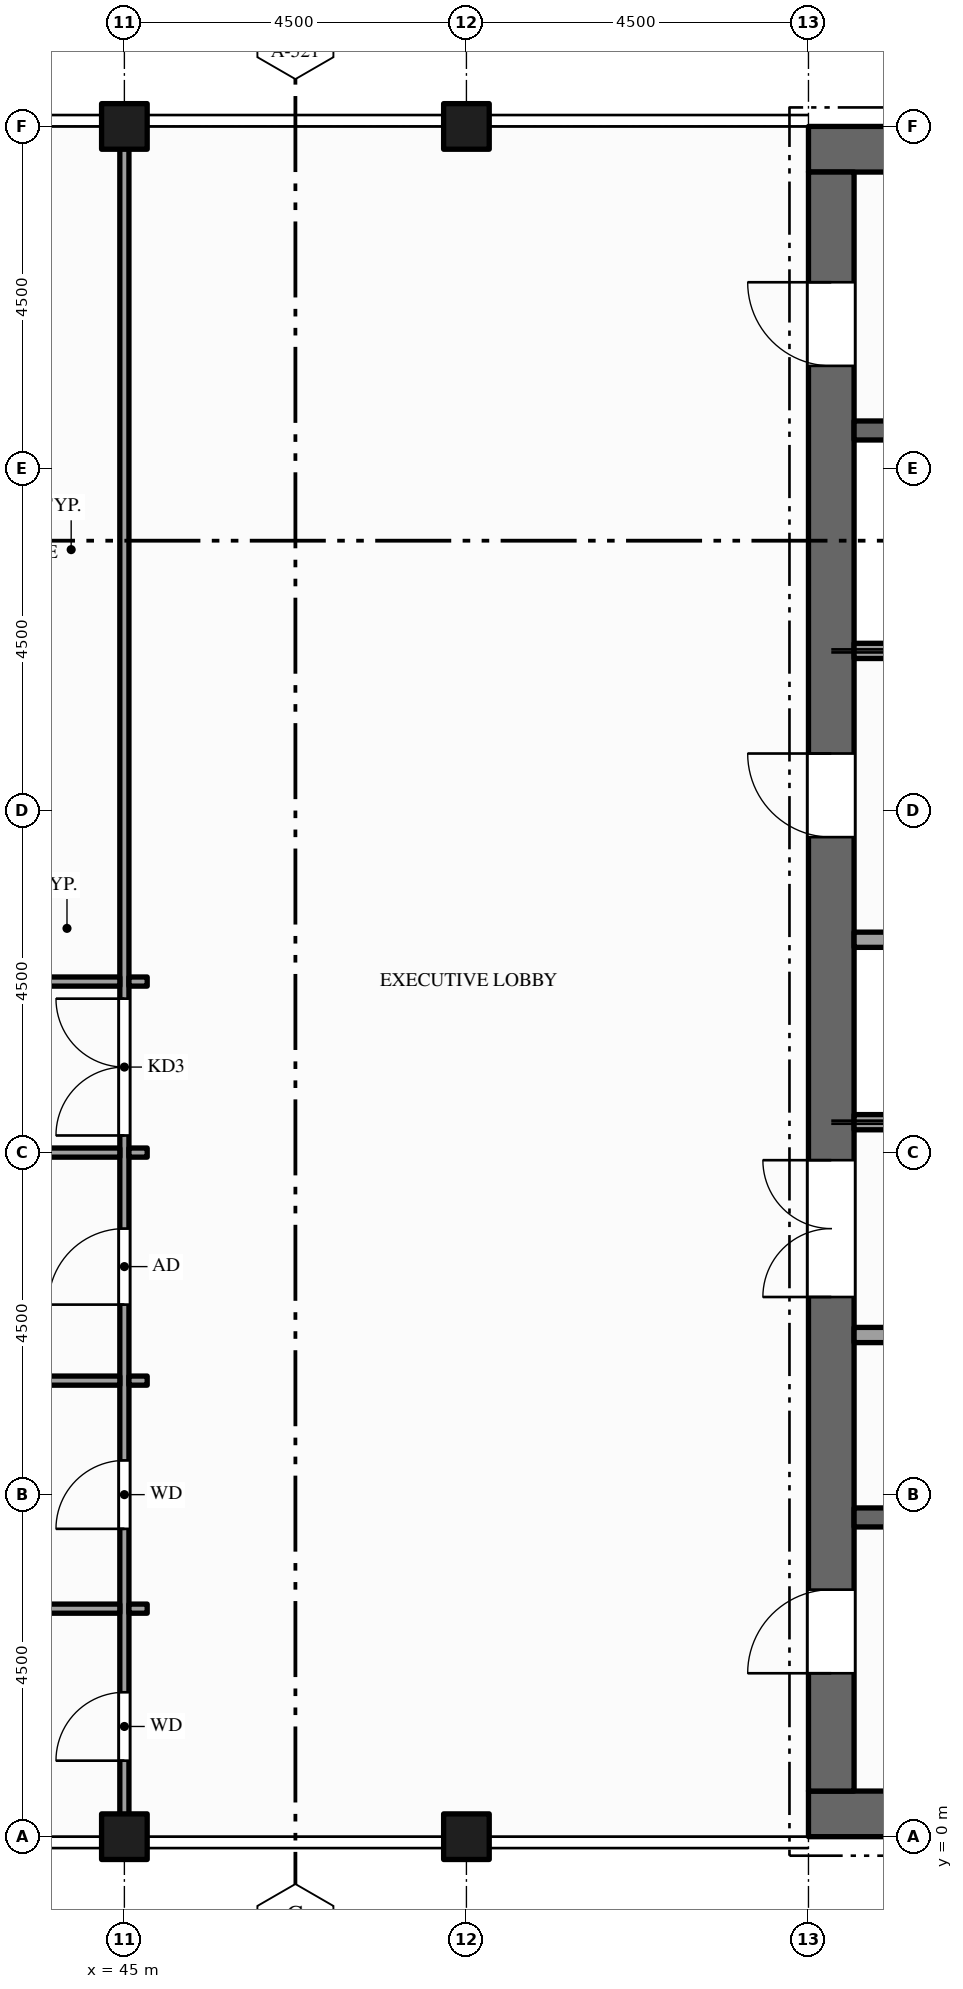
"""IFC4 building model, lengths in metres.
Left out: names, types, materials, properties, quantities, classifications, styles, units other than length and angle.
Written with IfcOpenShell. Run it as: python <this file> out.ifc"""

import sys

from ifc_helpers import new_model, si_unit, direction, frame, frame_2d, origin, origin_2d, place, context, subcontext, project, spatial, rectangle, hollow_rectangle, extrude, element, fill, save


model = new_model("IFC4")
c1 = context("Model", 3, precision=1e-05, world=origin(), true_north=direction((0.0, 1.0)))
c2 = subcontext(c1, "Body", "Model", "MODEL_VIEW")
j1 = project(units=[si_unit("LENGTHUNIT", "METRE"), si_unit("PLANEANGLEUNIT", "RADIAN")], contexts=[c1])
p1 = place(None, origin())
s1 = spatial("IfcSite", under=j1, at=p1, CompositionType="ELEMENT")
p2 = place(p1, origin())
s2 = spatial("IfcBuilding", under=s1, at=p2, CompositionType="ELEMENT")
p3 = place(p2, frame((0.0, 0.0, 309.5)))
s3 = spatial("IfcBuildingStorey", under=s2, at=p3, CompositionType="ELEMENT", Elevation=309.5)
for number, where, z_axis, x_axis in (
    (1, (67.5, 0.3, -0.15), (0.0, 0.0, 1.0), (-1.0, 0.0, 0.0)),
    (2, (54.0, 22.2, -0.15), (0.0, 0.0, 1.0), (1.0, 0.0, 0.0)),
):
    element("IfcWall", number, at=place(p3, frame(where, z_axis=z_axis, x_axis=x_axis)), inside=s3, PredefinedType="SHEAR", context=c2, shape_type="SweptSolid", body=[
        extrude(rectangle(XDim=13.5, YDim=0.6, at=frame_2d((6.75, 0.0))), origin(), (0.0, 0.0, 1.0), 4.5),
    ])
p4 = place(p3, frame((54.3, 0.6, -0.15), z_axis=(0.0, 0.0, 1.0), x_axis=(0.0, 1.0, 0.0)))
e3 = element("IfcWall", 3, at=p4, inside=s3, PredefinedType="SHEAR", context=c2, shape_type="SweptSolid", body=[
    extrude(rectangle(XDim=21.3, YDim=0.6, at=frame_2d((10.65, 0.0))), origin(), (0.0, 0.0, 1.0), 4.5),
])
p5 = place(p4, frame((6.5, 0.0, 0.15)))
e4 = element("IfcOpeningElement", 4, at=p5, cuts=e3, PredefinedType="OPENING", context=c2, shape_type="SweptSolid", body=[
    extrude(rectangle(XDim=1.8, YDim=2.1, at=frame_2d((0.9, 1.05))), frame((0.0, 0.31, 0.0), z_axis=(0.0, -1.0, 0.0), x_axis=(1.0, 0.0, 0.0)), (0.0, 0.0, 1.0), 0.62),
])
p6 = place(p4, frame((12.55, 0.0, 0.15)))
e5 = element("IfcOpeningElement", 5, at=p6, cuts=e3, PredefinedType="OPENING", context=c2, shape_type="SweptSolid", body=[
    extrude(rectangle(XDim=1.1, YDim=2.1, at=frame_2d((0.55, 1.05))), frame((0.0, 0.31, 0.0), z_axis=(0.0, -1.0, 0.0), x_axis=(1.0, 0.0, 0.0)), (0.0, 0.0, 1.0), 0.62),
])
p7 = place(p4, frame((1.55, 0.0, 0.15)))
e6 = element("IfcOpeningElement", 6, at=p7, cuts=e3, PredefinedType="OPENING", context=c2, shape_type="SweptSolid", body=[
    extrude(rectangle(XDim=1.1, YDim=2.1, at=frame_2d((0.55, 1.05))), frame((0.0, 0.31, 0.0), z_axis=(0.0, -1.0, 0.0), x_axis=(1.0, 0.0, 0.0)), (0.0, 0.0, 1.0), 0.62),
])
p8 = place(p4, frame((18.75, 0.0, 0.15)))
e7 = element("IfcOpeningElement", 7, at=p8, cuts=e3, PredefinedType="OPENING", context=c2, shape_type="SweptSolid", body=[
    extrude(rectangle(XDim=1.1, YDim=2.1, at=frame_2d((0.55, 1.05))), frame((0.0, 0.31, 0.0), z_axis=(0.0, -1.0, 0.0), x_axis=(1.0, 0.0, 0.0)), (0.0, 0.0, 1.0), 0.62),
])
for number, where, z_axis, x_axis in (
    (8, (45.0, 0.0, -0.15), (0.0, 0.0, 1.0), (1.0, 0.0, 0.0)),
    (9, (45.0, 22.5, -0.15), (0.0, 0.0, 1.0), (1.0, 0.0, 0.0)),
    (10, (49.5, 0.0, -0.15), (0.0, 0.0, 1.0), (1.0, 0.0, 0.0)),
    (11, (49.5, 22.5, -0.15), (0.0, 0.0, 1.0), (1.0, 0.0, 0.0)),
):
    element("IfcColumn", number, at=place(p3, frame(where, z_axis=z_axis, x_axis=x_axis)), inside=s3, PredefinedType="COLUMN", context=c2, shape_type="SweptSolid", body=[
        extrude(hollow_rectangle(XDim=0.6, YDim=0.6, WallThickness=0.03, at=origin_2d()), origin(), (0.0, 0.0, 1.0), 4.5),
    ])
p9 = place(p3, frame((45.0, 0.01, 0.0), z_axis=(0.0, 0.0, 1.0), x_axis=(0.0, 1.0, 0.0)))
e12 = element("IfcWall", 12, at=p9, inside=s3, PredefinedType="PARTITIONING", context=c2, shape_type="SweptSolid", body=[
    extrude(rectangle(XDim=22.48, YDim=0.12, at=frame_2d((11.24, 0.0))), origin(), (0.0, 0.0, 1.0), 3.359),
])
p10 = place(p9, frame((9.215, 0.0, 0.0)))
e13 = element("IfcOpeningElement", 13, at=p10, cuts=e12, PredefinedType="OPENING", context=c2, shape_type="SweptSolid", body=[
    extrude(rectangle(XDim=1.8, YDim=2.1, at=frame_2d((0.9, 1.05))), frame((0.0, 0.07, 0.0), z_axis=(0.0, -1.0, 0.0), x_axis=(1.0, 0.0, 0.0)), (0.0, 0.0, 1.0), 0.14),
])
p11 = place(p9, frame((0.99, 0.0, 0.0)))
e14 = element("IfcOpeningElement", 14, at=p11, cuts=e12, PredefinedType="OPENING", context=c2, shape_type="SweptSolid", body=[
    extrude(rectangle(XDim=0.9, YDim=2.1, at=frame_2d((0.45, 1.05))), frame((0.0, 0.07, 0.0), z_axis=(0.0, -1.0, 0.0), x_axis=(1.0, 0.0, 0.0)), (0.0, 0.0, 1.0), 0.14),
])
p12 = place(p9, frame((4.04, 0.0, 0.0)))
e15 = element("IfcOpeningElement", 15, at=p12, cuts=e12, PredefinedType="OPENING", context=c2, shape_type="SweptSolid", body=[
    extrude(rectangle(XDim=0.9, YDim=2.1, at=frame_2d((0.45, 1.05))), frame((0.0, 0.07, 0.0), z_axis=(0.0, -1.0, 0.0), x_axis=(1.0, 0.0, 0.0)), (0.0, 0.0, 1.0), 0.14),
])
p13 = place(p9, frame((6.99, 0.0, 0.0)))
e16 = element("IfcOpeningElement", 16, at=p13, cuts=e12, PredefinedType="OPENING", context=c2, shape_type="SweptSolid", body=[
    extrude(rectangle(XDim=1.0, YDim=2.1, at=frame_2d((0.5, 1.05))), frame((0.0, 0.07, 0.0), z_axis=(0.0, -1.0, 0.0), x_axis=(1.0, 0.0, 0.0)), (0.0, 0.0, 1.0), 0.14),
])
p14 = place(p3, frame((40.56, 3.0, 0.0), z_axis=(0.0, 0.0, 1.0), x_axis=(1.0, 0.0, 0.0)))
e17 = element("IfcWall", 17, at=p14, inside=s3, PredefinedType="PARTITIONING", context=c2, shape_type="SweptSolid", body=[
    extrude(rectangle(XDim=4.38, YDim=0.12, at=frame_2d((2.19, 0.0))), origin(), (0.0, 0.0, 1.0), 3.359),
])
p15 = place(p3, frame((45.06, 3.0, 0.0), z_axis=(0.0, 0.0, 1.0), x_axis=(1.0, 0.0, 0.0)))
e18 = element("IfcWall", 18, at=p15, inside=s3, PredefinedType="PARTITIONING", context=c2, shape_type="SweptSolid", body=[
    extrude(rectangle(XDim=0.24, YDim=0.12, at=frame_2d((0.12, 0.0))), origin(), (0.0, 0.0, 1.0), 3.359),
])
p16 = place(p3, frame((54.6, 4.2, 0.0), z_axis=(0.0, 0.0, 1.0), x_axis=(1.0, 0.0, 0.0)))
e19 = element("IfcWall", 19, at=p16, inside=s3, PredefinedType="SHEAR", context=c2, shape_type="SweptSolid", body=[
    extrude(rectangle(XDim=6.675, YDim=0.25, at=frame_2d((3.337, 0.0))), origin(), (0.0, 0.0, 1.0), 4.35),
])
p17 = place(p3, frame((40.56, 6.0, 0.0), z_axis=(0.0, 0.0, 1.0), x_axis=(1.0, 0.0, 0.0)))
e20 = element("IfcWall", 20, at=p17, inside=s3, PredefinedType="PARTITIONING", context=c2, shape_type="SweptSolid", body=[
    extrude(rectangle(XDim=4.38, YDim=0.12, at=frame_2d((2.19, 0.0))), origin(), (0.0, 0.0, 1.0), 3.359),
])
p18 = place(p3, frame((45.06, 6.0, 0.0), z_axis=(0.0, 0.0, 1.0), x_axis=(1.0, 0.0, 0.0)))
e21 = element("IfcWall", 21, at=p18, inside=s3, PredefinedType="PARTITIONING", context=c2, shape_type="SweptSolid", body=[
    extrude(rectangle(XDim=0.24, YDim=0.12, at=frame_2d((0.12, 0.0))), origin(), (0.0, 0.0, 1.0), 3.359),
])
p19 = place(p3, frame((54.6, 6.6, 0.0), z_axis=(0.0, 0.0, 1.0), x_axis=(1.0, 0.0, 0.0)))
e22 = element("IfcWall", 22, at=p19, inside=s3, PredefinedType="PARTITIONING", context=c2, shape_type="SweptSolid", body=[
    extrude(rectangle(XDim=4.9, YDim=0.2, at=frame_2d((2.45, 0.0))), origin(), (0.0, 0.0, 1.0), 4.35),
])
p20 = place(p19, frame((2.0, 0.0, 0.0)))
e23 = element("IfcOpeningElement", 23, at=p20, cuts=e22, PredefinedType="OPENING", context=c2, shape_type="SweptSolid", body=[
    extrude(rectangle(XDim=0.9, YDim=2.1, at=frame_2d((0.45, 1.05))), frame((0.0, 0.11, 0.0), z_axis=(0.0, -1.0, 0.0), x_axis=(1.0, 0.0, 0.0)), (0.0, 0.0, 1.0), 0.22),
])
p21 = place(p3, frame((40.56, 9.0, 0.0), z_axis=(0.0, 0.0, 1.0), x_axis=(1.0, 0.0, 0.0)))
e24 = element("IfcWall", 24, at=p21, inside=s3, PredefinedType="PARTITIONING", context=c2, shape_type="SweptSolid", body=[
    extrude(rectangle(XDim=4.38, YDim=0.12, at=frame_2d((2.19, 0.0))), origin(), (0.0, 0.0, 1.0), 3.359),
])
p22 = place(p3, frame((45.06, 9.0, 0.0), z_axis=(0.0, 0.0, 1.0), x_axis=(1.0, 0.0, 0.0)))
e25 = element("IfcWall", 25, at=p22, inside=s3, PredefinedType="PARTITIONING", context=c2, shape_type="SweptSolid", body=[
    extrude(rectangle(XDim=0.24, YDim=0.12, at=frame_2d((0.12, 0.0))), origin(), (0.0, 0.0, 1.0), 3.359),
])
p23 = place(p3, frame((54.6, 9.4, 0.0), z_axis=(0.0, 0.0, 1.0), x_axis=(1.0, 0.0, 0.0)))
e26 = element("IfcWall", 26, at=p23, inside=s3, PredefinedType="SOLIDWALL", context=c2, shape_type="SweptSolid", body=[
    extrude(rectangle(XDim=2.7, YDim=0.2, at=frame_2d((1.35, 0.0))), origin(), (0.0, 0.0, 1.0), 4.35),
])
p24 = place(p23, frame((0.8, 0.0, 0.012)))
e27 = element("IfcOpeningElement", 27, at=p24, cuts=e26, PredefinedType="OPENING", context=c2, shape_type="SweptSolid", body=[
    extrude(rectangle(XDim=1.1, YDim=2.1, at=frame_2d((0.55, 1.05))), frame((0.0, 0.11, 0.0), z_axis=(0.0, -1.0, 0.0), x_axis=(1.0, 0.0, 0.0)), (0.0, 0.0, 1.0), 0.22),
])
p25 = place(p3, frame((40.56, 11.25, 0.0), z_axis=(0.0, 0.0, 1.0), x_axis=(1.0, 0.0, 0.0)))
e28 = element("IfcWall", 28, at=p25, inside=s3, PredefinedType="PARTITIONING", context=c2, shape_type="SweptSolid", body=[
    extrude(rectangle(XDim=4.38, YDim=0.12, at=frame_2d((2.19, 0.0))), origin(), (0.0, 0.0, 1.0), 3.359),
])
p26 = place(p25, frame((1.74, 0.0, 0.0)))
e29 = element("IfcOpeningElement", 29, at=p26, cuts=e28, PredefinedType="OPENING", context=c2, shape_type="SweptSolid", body=[
    extrude(rectangle(XDim=0.9, YDim=2.1, at=frame_2d((0.45, 1.05))), frame((0.0, 0.07, 0.0), z_axis=(0.0, -1.0, 0.0), x_axis=(1.0, 0.0, 0.0)), (0.0, 0.0, 1.0), 0.14),
])
p27 = place(p3, frame((45.06, 11.25, 0.0), z_axis=(0.0, 0.0, 1.0), x_axis=(1.0, 0.0, 0.0)))
e30 = element("IfcWall", 30, at=p27, inside=s3, PredefinedType="PARTITIONING", context=c2, shape_type="SweptSolid", body=[
    extrude(rectangle(XDim=0.24, YDim=0.12, at=frame_2d((0.12, 0.0))), origin(), (0.0, 0.0, 1.0), 3.359),
])
p28 = place(p3, frame((54.6, 11.8, 0.0), z_axis=(0.0, 0.0, 1.0), x_axis=(1.0, 0.0, 0.0)))
e31 = element("IfcWall", 31, at=p28, inside=s3, PredefinedType="SOLIDWALL", context=c2, shape_type="SweptSolid", body=[
    extrude(rectangle(XDim=2.7, YDim=0.2, at=frame_2d((1.35, 0.0))), origin(), (0.0, 0.0, 1.0), 4.35),
])
p29 = place(p3, frame((54.6, 15.6, 0.0), z_axis=(0.0, 0.0, 1.0), x_axis=(1.0, 0.0, 0.0)))
e32 = element("IfcWall", 32, at=p29, inside=s3, PredefinedType="SOLIDWALL", context=c2, shape_type="SweptSolid", body=[
    extrude(rectangle(XDim=2.7, YDim=0.2, at=frame_2d((1.35, 0.0))), origin(), (0.0, 0.0, 1.0), 4.35),
])
p30 = place(p29, frame((0.8, 0.0, 0.012)))
e33 = element("IfcOpeningElement", 33, at=p30, cuts=e32, PredefinedType="OPENING", context=c2, shape_type="SweptSolid", body=[
    extrude(rectangle(XDim=1.1, YDim=2.1, at=frame_2d((0.55, 1.05))), frame((0.0, 0.11, 0.0), z_axis=(0.0, -1.0, 0.0), x_axis=(1.0, 0.0, 0.0)), (0.0, 0.0, 1.0), 0.22),
])
p31 = place(p3, frame((54.6, 18.5, 0.0), z_axis=(0.0, 0.0, 1.0), x_axis=(1.0, 0.0, 0.0)))
e34 = element("IfcWall", 34, at=p31, inside=s3, PredefinedType="SHEAR", context=c2, shape_type="SweptSolid", body=[
    extrude(rectangle(XDim=6.675, YDim=0.25, at=frame_2d((3.337, 0.0))), origin(), (0.0, 0.0, 1.0), 4.35),
])
p32 = place(p5, origin())
e35 = element("IfcDoor", 35, at=p32, inside=s3, OperationType="DOUBLE_DOOR_SINGLE_SWING", PredefinedType="DOOR", context=c2, shape_type="SweptSolid", body=[
    extrude(rectangle(XDim=1.8, YDim=2.1, at=frame_2d((0.9, 1.05))), frame((0.0, 0.025, 0.0), z_axis=(0.0, -1.0, 0.0), x_axis=(1.0, 0.0, 0.0)), (0.0, 0.0, 1.0), 0.05),
])
fill(e4, e35)
p33 = place(p6, origin())
e36 = element("IfcDoor", 36, at=p33, inside=s3, OperationType="SINGLE_SWING_RIGHT", PredefinedType="DOOR", context=c2, shape_type="SweptSolid", body=[
    extrude(rectangle(XDim=1.1, YDim=2.1, at=frame_2d((0.55, 1.05))), frame((0.0, 0.025, 0.0), z_axis=(0.0, -1.0, 0.0), x_axis=(1.0, 0.0, 0.0)), (0.0, 0.0, 1.0), 0.05),
])
fill(e5, e36)
p34 = place(p7, origin())
e37 = element("IfcDoor", 37, at=p34, inside=s3, OperationType="SINGLE_SWING_LEFT", PredefinedType="DOOR", context=c2, shape_type="SweptSolid", body=[
    extrude(rectangle(XDim=1.1, YDim=2.1, at=frame_2d((0.55, 1.05))), frame((0.0, 0.025, 0.0), z_axis=(0.0, -1.0, 0.0), x_axis=(1.0, 0.0, 0.0)), (0.0, 0.0, 1.0), 0.05),
])
fill(e6, e37)
p35 = place(p8, origin())
e38 = element("IfcDoor", 38, at=p35, inside=s3, OperationType="SINGLE_SWING_RIGHT", PredefinedType="DOOR", context=c2, shape_type="SweptSolid", body=[
    extrude(rectangle(XDim=1.1, YDim=2.1, at=frame_2d((0.55, 1.05))), frame((0.0, 0.025, 0.0), z_axis=(0.0, -1.0, 0.0), x_axis=(1.0, 0.0, 0.0)), (0.0, 0.0, 1.0), 0.05),
])
fill(e7, e38)
p36 = place(p10, origin())
e39 = element("IfcDoor", 39, at=p36, inside=s3, OperationType="DOUBLE_DOOR_SINGLE_SWING", PredefinedType="DOOR", context=c2, shape_type="SweptSolid", body=[
    extrude(rectangle(XDim=1.8, YDim=2.1, at=frame_2d((0.9, 1.05))), frame((0.0, 0.025, 0.0), z_axis=(0.0, -1.0, 0.0), x_axis=(1.0, 0.0, 0.0)), (0.0, 0.0, 1.0), 0.05),
])
fill(e13, e39)
p37 = place(p11, origin())
e40 = element("IfcDoor", 40, at=p37, inside=s3, OperationType="SINGLE_SWING_LEFT", PredefinedType="DOOR", context=c2, shape_type="SweptSolid", body=[
    extrude(rectangle(XDim=0.9, YDim=2.1, at=frame_2d((0.45, 1.05))), frame((0.0, 0.025, 0.0), z_axis=(0.0, -1.0, 0.0), x_axis=(1.0, 0.0, 0.0)), (0.0, 0.0, 1.0), 0.05),
])
fill(e14, e40)
p38 = place(p12, origin())
e41 = element("IfcDoor", 41, at=p38, inside=s3, OperationType="SINGLE_SWING_LEFT", PredefinedType="DOOR", context=c2, shape_type="SweptSolid", body=[
    extrude(rectangle(XDim=0.9, YDim=2.1, at=frame_2d((0.45, 1.05))), frame((0.0, 0.025, 0.0), z_axis=(0.0, -1.0, 0.0), x_axis=(1.0, 0.0, 0.0)), (0.0, 0.0, 1.0), 0.05),
])
fill(e15, e41)
p39 = place(p13, origin())
e42 = element("IfcDoor", 42, at=p39, inside=s3, OperationType="SINGLE_SWING_LEFT", PredefinedType="DOOR", context=c2, shape_type="SweptSolid", body=[
    extrude(rectangle(XDim=1.0, YDim=2.1, at=frame_2d((0.5, 1.05))), frame((0.0, 0.025, 0.0), z_axis=(0.0, -1.0, 0.0), x_axis=(1.0, 0.0, 0.0)), (0.0, 0.0, 1.0), 0.05),
])
fill(e16, e42)
save(model, sys.argv[1])
